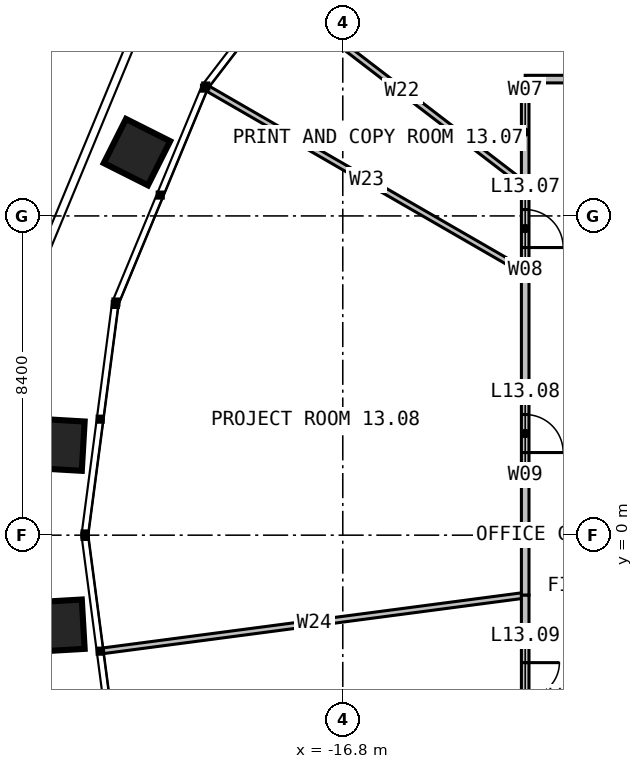
"""IFC4 building model, lengths in metres.
Left out: names, types, materials, properties, quantities, classifications, styles, units other than length and angle.
Written with IfcOpenShell. Run it as: python <this file> out.ifc"""

import sys

from ifc_helpers import new_model, si_unit, direction, frame, frame_2d, origin, place, context, subcontext, project, spatial, rectangle, extrude, element, fill, save


model = new_model("IFC4")
c1 = context("Model", 3, precision=1e-05, world=origin(), true_north=direction((0.0, 1.0)))
c2 = subcontext(c1, "Body", "Model", "MODEL_VIEW")
j1 = project(units=[si_unit("LENGTHUNIT", "METRE"), si_unit("PLANEANGLEUNIT", "RADIAN")], contexts=[c1])
p1 = place(None, origin())
s1 = spatial("IfcSite", under=j1, at=p1, CompositionType="ELEMENT")
p2 = place(p1, origin())
s2 = spatial("IfcBuilding", under=s1, at=p2, CompositionType="ELEMENT")
p3 = place(p2, frame((0.0, 0.0, 57.0)))
s3 = spatial("IfcBuildingStorey", under=s2, at=p3, CompositionType="ELEMENT", Elevation=57.0)
p4 = place(p3, frame((-6.928, 12.0, 0.0), z_axis=(0.0, 0.0, 1.0), x_axis=(-0.499991431567, 0.866030350715, 0.0)))
e1 = element("IfcWall", 1, at=p4, inside=s3, PredefinedType="PARTITIONING", context=c2, shape_type="SweptSolid", body=[
    extrude(rectangle(XDim=9.638, YDim=0.15, at=frame_2d((4.819, 0.0))), origin(), (0.0, 0.0, 1.0), 2.79),
])
p5 = place(p3, frame((-12.0, 9.208, 0.0), z_axis=(0.0, 0.0, 1.0), x_axis=(-0.793362371633, 0.608749658954, 0.0)))
e2 = element("IfcWall", 2, at=p5, inside=s3, PredefinedType="PARTITIONING", context=c2, shape_type="SweptSolid", body=[
    extrude(rectangle(XDim=8.167, YDim=0.15, at=frame_2d((4.084, 0.0))), origin(), (0.0, 0.0, 1.0), 2.79),
])
p6 = place(p3, frame((-12.0, 6.928, 0.0), z_axis=(0.0, 0.0, 1.0), x_axis=(-0.866030350715, 0.499991431567, 0.0)))
e3 = element("IfcWall", 3, at=p6, inside=s3, PredefinedType="PARTITIONING", context=c2, shape_type="SweptSolid", body=[
    extrude(rectangle(XDim=9.638, YDim=0.15, at=frame_2d((4.819, 0.0))), origin(), (0.0, 0.0, 1.0), 2.79),
])
p7 = place(p3, frame((-12.0, -1.58, 0.0), z_axis=(0.0, 0.0, 1.0), x_axis=(-0.991446050429, -0.130517160134, 0.0)))
e4 = element("IfcWall", 4, at=p7, inside=s3, PredefinedType="PARTITIONING", context=c2, shape_type="SweptSolid", body=[
    extrude(rectangle(XDim=11.19, YDim=0.15, at=frame_2d((5.595, 0.0))), origin(), (0.0, 0.0, 1.0), 2.79),
])
p8 = place(p3, frame((-6.928, 12.0, 0.0), z_axis=(0.0, 0.0, 1.0), x_axis=(-1.0, 0.0, 0.0)))
e5 = element("IfcWall", 5, at=p8, inside=s3, PredefinedType="PARTITIONING", context=c2, shape_type="SweptSolid", body=[
    extrude(rectangle(XDim=5.072, YDim=0.2, at=frame_2d((2.536, 0.0))), origin(), (0.0, 0.0, 1.0), 3.8),
])
p9 = place(p8, frame((2.036, 0.0, 0.0)))
e6 = element("IfcOpeningElement", 6, at=p9, cuts=e5, PredefinedType="OPENING", context=c2, shape_type="SweptSolid", body=[
    extrude(rectangle(XDim=1.0, YDim=2.2, at=frame_2d((0.5, 1.1))), frame((0.0, 0.11, 0.0), z_axis=(0.0, -1.0, 0.0), x_axis=(1.0, 0.0, 0.0)), (0.0, 0.0, 1.0), 0.22),
])
p10 = place(p3, frame((-12.0, 12.0, 0.0), z_axis=(0.0, 0.0, 1.0), x_axis=(0.0, -1.0, 0.0)))
e7 = element("IfcWall", 7, at=p10, inside=s3, PredefinedType="PARTITIONING", context=c2, shape_type="SweptSolid", body=[
    extrude(rectangle(XDim=2.792, YDim=0.2, at=frame_2d((1.396, 0.0))), origin(), (0.0, 0.0, 1.0), 3.8),
])
p11 = place(p3, frame((-12.0, 9.208, 0.0), z_axis=(0.0, 0.0, 1.0), x_axis=(0.0, -1.0, 0.0)))
e8 = element("IfcWall", 8, at=p11, inside=s3, PredefinedType="PARTITIONING", context=c2, shape_type="SweptSolid", body=[
    extrude(rectangle(XDim=2.28, YDim=0.2, at=frame_2d((1.14, 0.0))), origin(), (0.0, 0.0, 1.0), 3.8),
])
p12 = place(p11, frame((0.64, 0.0, 0.0)))
e9 = element("IfcOpeningElement", 9, at=p12, cuts=e8, PredefinedType="OPENING", context=c2, shape_type="SweptSolid", body=[
    extrude(rectangle(XDim=1.0, YDim=2.2, at=frame_2d((0.5, 1.1))), frame((0.0, 0.11, 0.0), z_axis=(0.0, -1.0, 0.0), x_axis=(1.0, 0.0, 0.0)), (0.0, 0.0, 1.0), 0.22),
])
p13 = place(p3, frame((-12.0, 6.928, 0.0), z_axis=(0.0, 0.0, 1.0), x_axis=(0.0, -1.0, 0.0)))
e10 = element("IfcWall", 10, at=p13, inside=s3, PredefinedType="PARTITIONING", context=c2, shape_type="SweptSolid", body=[
    extrude(rectangle(XDim=8.508, YDim=0.2, at=frame_2d((4.254, 0.0))), origin(), (0.0, 0.0, 1.0), 3.8),
])
p14 = place(p13, frame((3.754, 0.0, 0.0)))
e11 = element("IfcOpeningElement", 11, at=p14, cuts=e10, PredefinedType="OPENING", context=c2, shape_type="SweptSolid", body=[
    extrude(rectangle(XDim=1.0, YDim=2.2, at=frame_2d((0.5, 1.1))), frame((0.0, 0.11, 0.0), z_axis=(0.0, -1.0, 0.0), x_axis=(1.0, 0.0, 0.0)), (0.0, 0.0, 1.0), 0.22),
])
p15 = place(p3, frame((-12.0, -1.58, 0.0), z_axis=(0.0, 0.0, 1.0), x_axis=(0.0, -1.0, 0.0)))
e12 = element("IfcWall", 12, at=p15, inside=s3, PredefinedType="PARTITIONING", context=c2, shape_type="SweptSolid", body=[
    extrude(rectangle(XDim=5.348, YDim=0.2, at=frame_2d((2.674, 0.0))), origin(), (0.0, 0.0, 1.0), 3.8),
])
p16 = place(p15, frame((1.774, 0.0, 0.0)))
e13 = element("IfcOpeningElement", 13, at=p16, cuts=e12, PredefinedType="OPENING", context=c2, shape_type="SweptSolid", body=[
    extrude(rectangle(XDim=1.8, YDim=2.2, at=frame_2d((0.9, 1.1))), frame((0.0, 0.11, 0.0), z_axis=(0.0, -1.0, 0.0), x_axis=(1.0, 0.0, 0.0)), (0.0, 0.0, 1.0), 0.22),
])
p17 = place(p12, origin())
e14 = element("IfcDoor", 14, at=p17, inside=s3, OperationType="SINGLE_SWING_RIGHT", PredefinedType="DOOR", context=c2, shape_type="SweptSolid", body=[
    extrude(rectangle(XDim=1.0, YDim=2.2, at=frame_2d((0.5, 1.1))), frame((0.0, 0.025, 0.0), z_axis=(0.0, -1.0, 0.0), x_axis=(1.0, 0.0, 0.0)), (0.0, 0.0, 1.0), 0.05),
])
fill(e9, e14)
p18 = place(p14, origin())
e15 = element("IfcDoor", 15, at=p18, inside=s3, OperationType="SINGLE_SWING_RIGHT", PredefinedType="DOOR", context=c2, shape_type="SweptSolid", body=[
    extrude(rectangle(XDim=1.0, YDim=2.2, at=frame_2d((0.5, 1.1))), frame((0.0, 0.025, 0.0), z_axis=(0.0, -1.0, 0.0), x_axis=(1.0, 0.0, 0.0)), (0.0, 0.0, 1.0), 0.05),
])
fill(e11, e15)
p19 = place(p16, origin())
e16 = element("IfcDoor", 16, at=p19, inside=s3, OperationType="DOUBLE_DOOR_SINGLE_SWING", PredefinedType="DOOR", context=c2, shape_type="SweptSolid", body=[
    extrude(rectangle(XDim=1.8, YDim=2.2, at=frame_2d((0.9, 1.1))), frame((0.0, 0.025, 0.0), z_axis=(0.0, -1.0, 0.0), x_axis=(1.0, 0.0, 0.0)), (0.0, 0.0, 1.0), 0.05),
])
fill(e13, e16)
save(model, sys.argv[1])
